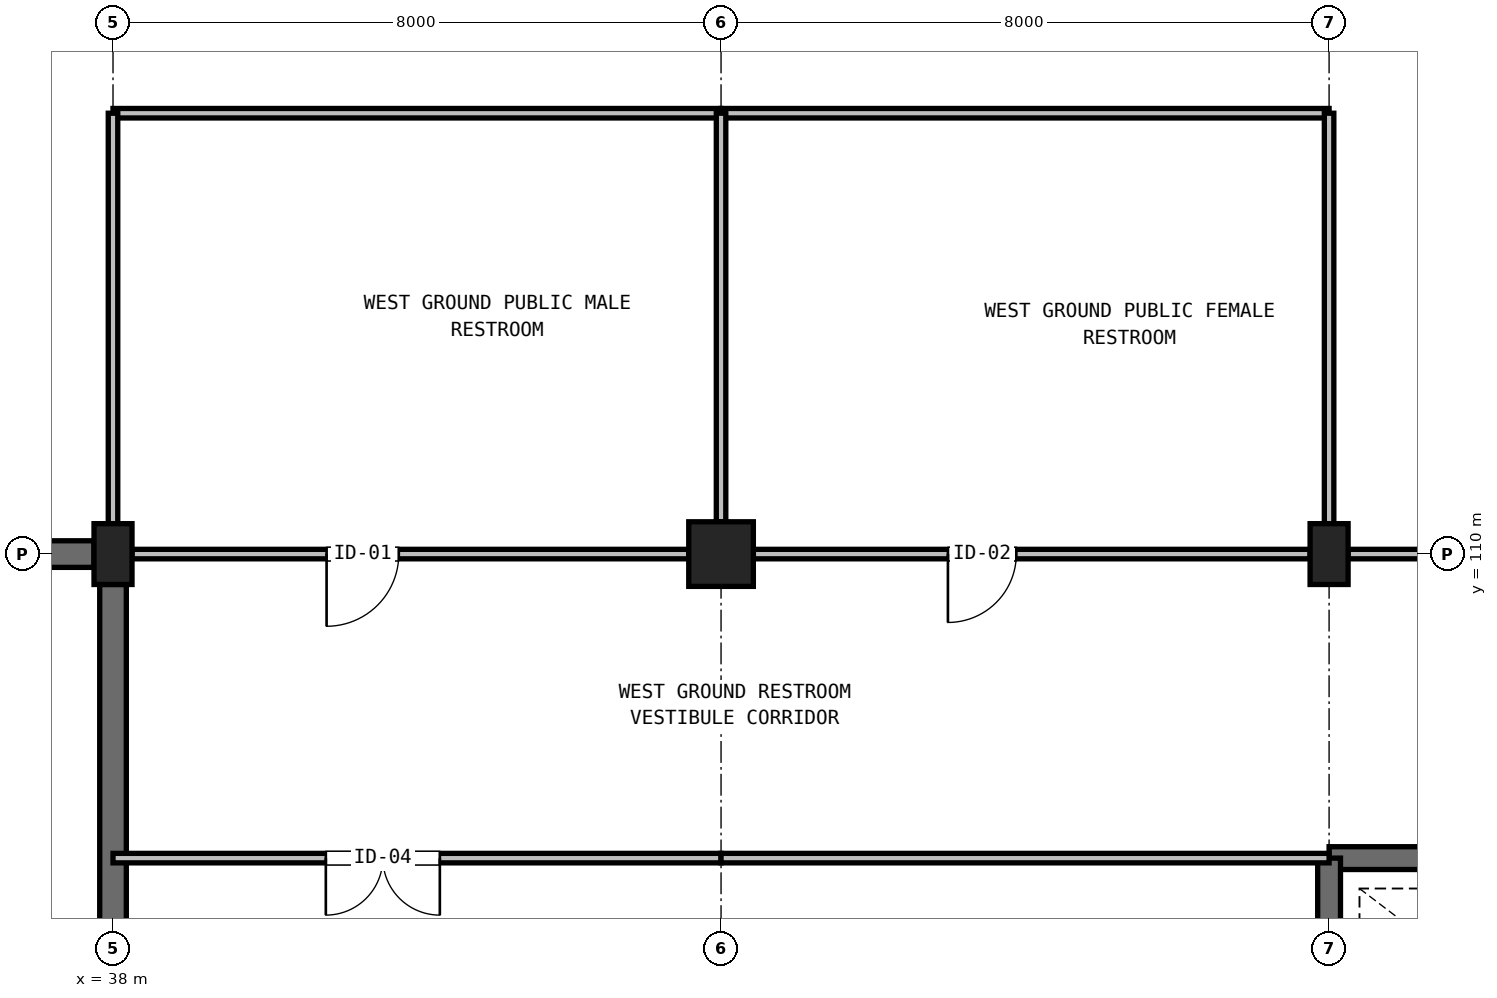
"""IFC4 building model, lengths in metres.
Left out: names, types, materials, properties, quantities, classifications, styles, units other than length and angle.
Written with IfcOpenShell. Run it as: python <this file> out.ifc"""

import sys

from ifc_helpers import new_model, si_unit, direction, frame, frame_2d, origin, origin_2d, place, context, subcontext, project, spatial, rectangle, extrude, element, fill, save


model = new_model("IFC4")
c1 = context("Model", 3, precision=1e-05, world=origin(), true_north=direction((0.0, 1.0)))
c2 = subcontext(c1, "Body", "Model", "MODEL_VIEW")
j1 = project(units=[si_unit("LENGTHUNIT", "METRE"), si_unit("PLANEANGLEUNIT", "RADIAN")], contexts=[c1])
p1 = place(None, origin())
s1 = spatial("IfcSite", under=j1, at=p1, CompositionType="ELEMENT")
p2 = place(p1, origin())
s2 = spatial("IfcBuilding", under=s1, at=p2, CompositionType="ELEMENT")
p3 = place(p2, origin())
s3 = spatial("IfcBuildingStorey", under=s2, at=p3, CompositionType="ELEMENT", Elevation=0.0)
p4 = place(p3, frame((38.0, 110.0, 0.0), z_axis=(0.0, 0.0, 1.0), x_axis=(1.0, 0.0, 0.0)))
e1 = element("IfcColumn", 1, at=p4, inside=s3, PredefinedType="COLUMN", context=c2, shape_type="SweptSolid", body=[
    extrude(rectangle(XDim=0.5, YDim=0.8, at=origin_2d()), origin(), (0.0, 0.0, 1.0), 5.4),
])
p5 = place(p3, frame((46.0, 110.0, 0.0), z_axis=(0.0, 0.0, 1.0), x_axis=(1.0, 0.0, 0.0)))
e2 = element("IfcColumn", 2, at=p5, inside=s3, PredefinedType="COLUMN", context=c2, shape_type="SweptSolid", body=[
    extrude(rectangle(XDim=0.85, YDim=0.85, at=origin_2d()), origin(), (0.0, 0.0, 1.0), 5.4),
])
p6 = place(p3, frame((54.0, 110.0, 0.0), z_axis=(0.0, 0.0, 1.0), x_axis=(1.0, 0.0, 0.0)))
e3 = element("IfcColumn", 3, at=p6, inside=s3, PredefinedType="COLUMN", context=c2, shape_type="SweptSolid", body=[
    extrude(rectangle(XDim=0.5, YDim=0.8, at=origin_2d()), origin(), (0.0, 0.0, 1.0), 5.4),
])
p7 = place(p3, frame((30.4, 110.0, 0.0), z_axis=(0.0, 0.0, 1.0), x_axis=(1.0, 0.0, 0.0)))
e4 = element("IfcWall", 4, at=p7, inside=s3, PredefinedType="SHEAR", context=c2, shape_type="SweptSolid", body=[
    extrude(rectangle(XDim=7.35, YDim=0.35, at=frame_2d((3.675, 0.0))), origin(), (0.0, 0.0, 1.0), 5.18),
])
p8 = place(p3, frame((38.0, 102.4, 0.0), z_axis=(0.0, 0.0, 1.0), x_axis=(0.0, 1.0, 0.0)))
e5 = element("IfcWall", 5, at=p8, inside=s3, PredefinedType="SHEAR", context=c2, shape_type="SweptSolid", body=[
    extrude(rectangle(XDim=7.2, YDim=0.35, at=frame_2d((3.6, 0.0))), origin(), (0.0, 0.0, 1.0), 5.18),
])
p9 = place(p3, frame((54.0, 106.0, 0.0), z_axis=(0.0, 0.0, 1.0), x_axis=(1.0, 0.0, 0.0)))
e6 = element("IfcWall", 6, at=p9, inside=s3, PredefinedType="SHEAR", context=c2, shape_type="SweptSolid", body=[
    extrude(rectangle(XDim=8.0, YDim=0.3, at=frame_2d((4.0, 0.0))), origin(), (0.0, 0.0, 1.0), 5.18),
])
p10 = place(p3, frame((54.0, 102.4, 0.0), z_axis=(0.0, 0.0, 1.0), x_axis=(0.0, 1.0, 0.0)))
e7 = element("IfcWall", 7, at=p10, inside=s3, PredefinedType="SHEAR", context=c2, shape_type="SweptSolid", body=[
    extrude(rectangle(XDim=3.6, YDim=0.3, at=frame_2d((1.8, 0.0))), origin(), (0.0, 0.0, 1.0), 5.18),
])
p11 = place(p3, frame((38.0, 106.0, 0.0), z_axis=(0.0, 0.0, 1.0), x_axis=(1.0, 0.0, 0.0)))
e8 = element("IfcWall", 8, at=p11, inside=s3, PredefinedType="PARTITIONING", context=c2, shape_type="SweptSolid", body=[
    extrude(rectangle(XDim=8.0, YDim=0.125, at=frame_2d((4.0, 0.0))), origin(), (0.0, 0.0, 1.0), 5.1),
])
p12 = place(p11, frame((2.8, 0.0, 0.0)))
e9 = element("IfcOpeningElement", 9, at=p12, cuts=e8, PredefinedType="OPENING", context=c2, shape_type="SweptSolid", body=[
    extrude(rectangle(XDim=1.5, YDim=2.2, at=frame_2d((0.75, 1.1))), frame((0.0, 0.073, 0.0), z_axis=(0.0, -1.0, 0.0), x_axis=(1.0, 0.0, 0.0)), (0.0, 0.0, 1.0), 0.145),
])
p13 = place(p3, frame((46.0, 106.0, 0.0), z_axis=(0.0, 0.0, 1.0), x_axis=(1.0, 0.0, 0.0)))
e10 = element("IfcWall", 10, at=p13, inside=s3, PredefinedType="PARTITIONING", context=c2, shape_type="SweptSolid", body=[
    extrude(rectangle(XDim=8.0, YDim=0.125, at=frame_2d((4.0, 0.0))), origin(), (0.0, 0.0, 1.0), 5.1),
])
p14 = place(p3, frame((38.25, 110.0, 0.0), z_axis=(0.0, 0.0, 1.0), x_axis=(1.0, 0.0, 0.0)))
e11 = element("IfcWall", 11, at=p14, inside=s3, PredefinedType="PARTITIONING", context=c2, shape_type="SweptSolid", body=[
    extrude(rectangle(XDim=7.325, YDim=0.125, at=frame_2d((3.663, 0.0))), origin(), (0.0, 0.0, 1.0), 4.34),
])
p15 = place(p14, frame((2.56, 0.0, 0.0)))
e12 = element("IfcOpeningElement", 12, at=p15, cuts=e11, PredefinedType="OPENING", context=c2, shape_type="SweptSolid", body=[
    extrude(rectangle(XDim=0.95, YDim=2.1, at=frame_2d((0.475, 1.05))), frame((0.0, 0.073, 0.0), z_axis=(0.0, -1.0, 0.0), x_axis=(1.0, 0.0, 0.0)), (0.0, 0.0, 1.0), 0.145),
])
p16 = place(p3, frame((46.425, 110.0, 0.0), z_axis=(0.0, 0.0, 1.0), x_axis=(1.0, 0.0, 0.0)))
e13 = element("IfcWall", 13, at=p16, inside=s3, PredefinedType="PARTITIONING", context=c2, shape_type="SweptSolid", body=[
    extrude(rectangle(XDim=7.325, YDim=0.125, at=frame_2d((3.663, 0.0))), origin(), (0.0, 0.0, 1.0), 4.29),
])
p17 = place(p16, frame((2.56, 0.0, 0.0)))
e14 = element("IfcOpeningElement", 14, at=p17, cuts=e13, PredefinedType="OPENING", context=c2, shape_type="SweptSolid", body=[
    extrude(rectangle(XDim=0.9, YDim=2.1, at=frame_2d((0.45, 1.05))), frame((0.0, 0.073, 0.0), z_axis=(0.0, -1.0, 0.0), x_axis=(1.0, 0.0, 0.0)), (0.0, 0.0, 1.0), 0.145),
])
p18 = place(p3, frame((54.25, 110.0, 0.0), z_axis=(0.0, 0.0, 1.0), x_axis=(1.0, 0.0, 0.0)))
e15 = element("IfcWall", 15, at=p18, inside=s3, PredefinedType="PARTITIONING", context=c2, shape_type="SweptSolid", body=[
    extrude(rectangle(XDim=11.75, YDim=0.125, at=frame_2d((5.875, 0.0))), origin(), (0.0, 0.0, 1.0), 4.24),
])
for number, where, z_axis, x_axis in (
    (16, (38.0, 115.8, 0.0), (0.0, 0.0, 1.0), (1.0, 0.0, 0.0)),
    (17, (46.0, 115.8, 0.0), (0.0, 0.0, 1.0), (1.0, 0.0, 0.0)),
):
    element("IfcWall", number, at=place(p3, frame(where, z_axis=z_axis, x_axis=x_axis)), inside=s3, PredefinedType="PARTITIONING", context=c2, shape_type="SweptSolid", body=[
        extrude(rectangle(XDim=8.0, YDim=0.125, at=frame_2d((4.0, 0.0))), origin(), (0.0, 0.0, 1.0), 5.1),
    ])
p19 = place(p3, frame((38.0, 110.4, 0.0), z_axis=(0.0, 0.0, 1.0), x_axis=(0.0, 1.0, 0.0)))
e18 = element("IfcWall", 18, at=p19, inside=s3, PredefinedType="PARTITIONING", context=c2, shape_type="SweptSolid", body=[
    extrude(rectangle(XDim=5.4, YDim=0.125, at=frame_2d((2.7, 0.0))), origin(), (0.0, 0.0, 1.0), 4.34),
])
p20 = place(p3, frame((46.0, 110.425, 0.0), z_axis=(0.0, 0.0, 1.0), x_axis=(0.0, 1.0, 0.0)))
e19 = element("IfcWall", 19, at=p20, inside=s3, PredefinedType="PARTITIONING", context=c2, shape_type="SweptSolid", body=[
    extrude(rectangle(XDim=5.375, YDim=0.125, at=frame_2d((2.688, 0.0))), origin(), (0.0, 0.0, 1.0), 4.39),
])
p21 = place(p3, frame((54.0, 110.4, 0.0), z_axis=(0.0, 0.0, 1.0), x_axis=(0.0, 1.0, 0.0)))
e20 = element("IfcWall", 20, at=p21, inside=s3, PredefinedType="PARTITIONING", context=c2, shape_type="SweptSolid", body=[
    extrude(rectangle(XDim=5.4, YDim=0.125, at=frame_2d((2.7, 0.0))), origin(), (0.0, 0.0, 1.0), 4.24),
])
p22 = place(p12, frame((1.5, 0.0, 0.0), z_axis=(0.0, 0.0, 1.0), x_axis=(-1.0, 0.0, 0.0)))
e21 = element("IfcDoor", 21, at=p22, inside=s3, OperationType="DOUBLE_DOOR_SINGLE_SWING", PredefinedType="DOOR", context=c2, shape_type="SweptSolid", body=[
    extrude(rectangle(XDim=1.5, YDim=2.2, at=frame_2d((0.75, 1.1))), frame((0.0, 0.025, 0.0), z_axis=(0.0, -1.0, 0.0), x_axis=(1.0, 0.0, 0.0)), (0.0, 0.0, 1.0), 0.05),
])
fill(e9, e21)
p23 = place(p15, frame((0.95, 0.0, 0.0), z_axis=(0.0, 0.0, 1.0), x_axis=(-1.0, 0.0, 0.0)))
e22 = element("IfcDoor", 22, at=p23, inside=s3, OperationType="SINGLE_SWING_LEFT", PredefinedType="DOOR", context=c2, shape_type="SweptSolid", body=[
    extrude(rectangle(XDim=0.95, YDim=2.1, at=frame_2d((0.475, 1.05))), frame((0.0, 0.025, 0.0), z_axis=(0.0, -1.0, 0.0), x_axis=(1.0, 0.0, 0.0)), (0.0, 0.0, 1.0), 0.05),
])
fill(e12, e22)
p24 = place(p17, frame((0.9, 0.0, 0.0), z_axis=(0.0, 0.0, 1.0), x_axis=(-1.0, 0.0, 0.0)))
e23 = element("IfcDoor", 23, at=p24, inside=s3, OperationType="SINGLE_SWING_LEFT", PredefinedType="DOOR", context=c2, shape_type="SweptSolid", body=[
    extrude(rectangle(XDim=0.9, YDim=2.1, at=frame_2d((0.45, 1.05))), frame((0.0, 0.025, 0.0), z_axis=(0.0, -1.0, 0.0), x_axis=(1.0, 0.0, 0.0)), (0.0, 0.0, 1.0), 0.05),
])
fill(e14, e23)
save(model, sys.argv[1])
